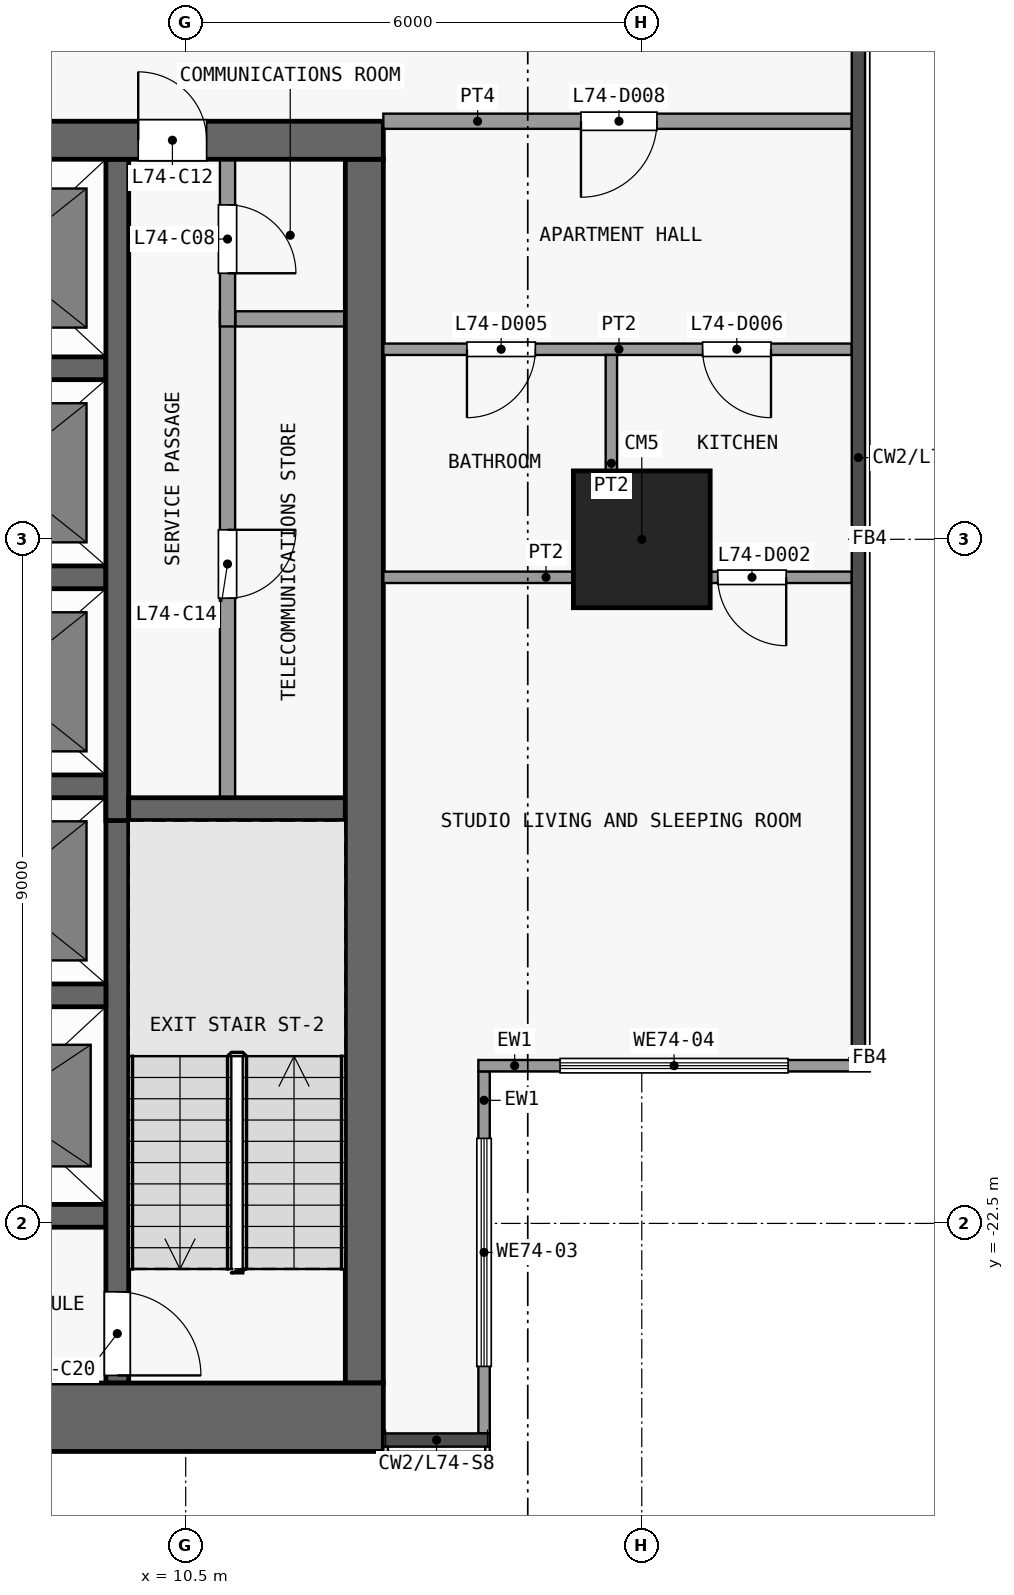
"""IFC4 building model, lengths in metres.
Left out: names, types, materials, properties, quantities, classifications, styles, units other than length and angle.
Written with IfcOpenShell. Run it as: python <this file> out.ifc"""

import sys

from ifc_helpers import new_model, si_unit, direction, frame, frame_2d, origin, origin_2d, place, context, subcontext, project, spatial, rectangle, extrude, element, fill, save


model = new_model("IFC4")
c1 = context("Model", 3, precision=1e-05, world=origin(), true_north=direction((0.0, 1.0)))
c2 = subcontext(c1, "Body", "Model", "MODEL_VIEW")
j1 = project(units=[si_unit("LENGTHUNIT", "METRE"), si_unit("PLANEANGLEUNIT", "RADIAN")], contexts=[c1])
p1 = place(None, origin())
s1 = spatial("IfcSite", under=j1, at=p1, CompositionType="ELEMENT")
p2 = place(p1, origin())
s2 = spatial("IfcBuilding", under=s1, at=p2, CompositionType="ELEMENT")
p3 = place(p2, frame((0.0, 0.0, 291.5)))
s3 = spatial("IfcBuildingStorey", under=s2, at=p3, CompositionType="ELEMENT", Elevation=291.5)
p4 = place(p3, frame((16.5, -13.5, 0.0), z_axis=(0.0, 0.0, 1.0), x_axis=(1.0, 0.0, 0.0)))
e1 = element("IfcColumn", 1, at=p4, inside=s3, PredefinedType="COLUMN", context=c2, shape_type="SweptSolid", body=[
    extrude(rectangle(XDim=1.8, YDim=1.8, at=origin_2d()), origin(), (0.0, 0.0, 1.0), 3.6),
])
p5 = place(p3, frame((-13.1, -25.05, 0.0), z_axis=(0.0, 0.0, 1.0), x_axis=(1.0, 0.0, 0.0)))
e2 = element("IfcWall", 2, at=p5, inside=s3, PredefinedType="SHEAR", context=c2, shape_type="SweptSolid", body=[
    extrude(rectangle(XDim=26.2, YDim=0.9, at=frame_2d((13.1, 0.0))), origin(), (0.0, 0.0, 1.0), 3.3),
])
p6 = place(p3, frame((-13.1, -8.25, 0.0), z_axis=(0.0, 0.0, 1.0), x_axis=(1.0, 0.0, 0.0)))
e3 = element("IfcWall", 3, at=p6, inside=s3, PredefinedType="SHEAR", context=c2, shape_type="SweptSolid", body=[
    extrude(rectangle(XDim=26.2, YDim=0.5, at=frame_2d((13.1, 0.0))), origin(), (0.0, 0.0, 1.0), 3.3),
])
p7 = place(p6, frame((7.4, 0.0, 0.0)))
e4 = element("IfcOpeningElement", 4, at=p7, cuts=e3, PredefinedType="OPENING", context=c2, shape_type="SweptSolid", body=[
    extrude(rectangle(XDim=1.8, YDim=2.1, at=frame_2d((0.9, 1.05))), frame((0.0, 0.26, 0.0), z_axis=(0.0, -1.0, 0.0), x_axis=(1.0, 0.0, 0.0)), (0.0, 0.0, 1.0), 0.52),
])
p8 = place(p6, frame((17.0, 0.0, 0.0)))
e5 = element("IfcOpeningElement", 5, at=p8, cuts=e3, PredefinedType="OPENING", context=c2, shape_type="SweptSolid", body=[
    extrude(rectangle(XDim=1.8, YDim=2.1, at=frame_2d((0.9, 1.05))), frame((0.0, 0.26, 0.0), z_axis=(0.0, -1.0, 0.0), x_axis=(1.0, 0.0, 0.0)), (0.0, 0.0, 1.0), 0.52),
])
p9 = place(p6, frame((2.325, 0.0, 0.0)))
e6 = element("IfcOpeningElement", 6, at=p9, cuts=e3, PredefinedType="OPENING", context=c2, shape_type="SweptSolid", body=[
    extrude(rectangle(XDim=0.9, YDim=2.1, at=frame_2d((0.45, 1.05))), frame((0.0, 0.26, 0.0), z_axis=(0.0, -1.0, 0.0), x_axis=(1.0, 0.0, 0.0)), (0.0, 0.0, 1.0), 0.52),
])
p10 = place(p6, frame((22.975, 0.0, 0.0)))
e7 = element("IfcOpeningElement", 7, at=p10, cuts=e3, PredefinedType="OPENING", context=c2, shape_type="SweptSolid", body=[
    extrude(rectangle(XDim=0.9, YDim=2.1, at=frame_2d((0.45, 1.05))), frame((0.0, 0.26, 0.0), z_axis=(0.0, -1.0, 0.0), x_axis=(1.0, 0.0, 0.0)), (0.0, 0.0, 1.0), 0.52),
])
p11 = place(p3, frame((12.85, -24.6, 0.0), z_axis=(0.0, 0.0, 1.0), x_axis=(0.0, 1.0, 0.0)))
e8 = element("IfcWall", 8, at=p11, inside=s3, PredefinedType="SHEAR", context=c2, shape_type="SweptSolid", body=[
    extrude(rectangle(XDim=16.1, YDim=0.5, at=frame_2d((8.05, 0.0))), origin(), (0.0, 0.0, 1.0), 3.3),
])
for number, where, z_axis, x_axis in (
    (9, (6.65, -22.4, 0.0), (0.0, 0.0, 1.0), (1.0, 0.0, 0.0)),
    (10, (6.65, -19.5, 0.0), (0.0, 0.0, 1.0), (1.0, 0.0, 0.0)),
):
    element("IfcWall", number, at=place(p3, frame(where, z_axis=z_axis, x_axis=x_axis)), inside=s3, PredefinedType="SHEAR", context=c2, shape_type="SweptSolid", body=[
        extrude(rectangle(XDim=2.8, YDim=0.3, at=frame_2d((1.4, 0.0))), origin(), (0.0, 0.0, 1.0), 3.3),
    ])
p12 = place(p3, frame((9.75, -17.05, 0.0), z_axis=(0.0, 0.0, 1.0), x_axis=(1.0, 0.0, 0.0)))
e11 = element("IfcWall", 11, at=p12, inside=s3, PredefinedType="SHEAR", context=c2, shape_type="SweptSolid", body=[
    extrude(rectangle(XDim=2.85, YDim=0.3, at=frame_2d((1.425, 0.0))), origin(), (0.0, 0.0, 1.0), 3.3),
])
for number, where, z_axis, x_axis in (
    (12, (6.65, -16.75, 0.0), (0.0, 0.0, 1.0), (1.0, 0.0, 0.0)),
    (13, (6.65, -14.0, 0.0), (0.0, 0.0, 1.0), (1.0, 0.0, 0.0)),
    (14, (6.65, -11.25, 0.0), (0.0, 0.0, 1.0), (1.0, 0.0, 0.0)),
):
    element("IfcWall", number, at=place(p3, frame(where, z_axis=z_axis, x_axis=x_axis)), inside=s3, PredefinedType="SHEAR", context=c2, shape_type="SweptSolid", body=[
        extrude(rectangle(XDim=2.8, YDim=0.3, at=frame_2d((1.4, 0.0))), origin(), (0.0, 0.0, 1.0), 3.3),
    ])
p13 = place(p3, frame((11.15, -10.6, 0.0), z_axis=(0.0, 0.0, 1.0), x_axis=(1.0, 0.0, 0.0)))
e15 = element("IfcWall", 15, at=p13, inside=s3, PredefinedType="PARTITIONING", context=c2, shape_type="SweptSolid", body=[
    extrude(rectangle(XDim=1.45, YDim=0.2, at=frame_2d((0.725, 0.0))), origin(), (0.0, 0.0, 1.0), 3.3),
])
p14 = place(p3, frame((9.6, -16.9, 0.0), z_axis=(0.0, 0.0, 1.0), x_axis=(0.0, -1.0, 0.0)))
e16 = element("IfcWall", 16, at=p14, inside=s3, PredefinedType="SHEAR", context=c2, shape_type="SweptSolid", body=[
    extrude(rectangle(XDim=7.7, YDim=0.3, at=frame_2d((3.85, 0.0))), origin(), (0.0, 0.0, 1.0), 3.3),
])
p15 = place(p14, frame((6.5, 0.0, 0.0)))
e17 = element("IfcOpeningElement", 17, at=p15, cuts=e16, PredefinedType="OPENING", context=c2, shape_type="SweptSolid", body=[
    extrude(rectangle(XDim=1.1, YDim=2.1, at=frame_2d((0.55, 1.05))), frame((0.0, 0.16, 0.0), z_axis=(0.0, -1.0, 0.0), x_axis=(1.0, 0.0, 0.0)), (0.0, 0.0, 1.0), 0.32),
])
p16 = place(p3, frame((9.6, -17.2, 0.0), z_axis=(0.0, 0.0, 1.0), x_axis=(0.0, 1.0, 0.0)))
e18 = element("IfcWall", 18, at=p16, inside=s3, PredefinedType="SHEAR", context=c2, shape_type="SweptSolid", body=[
    extrude(rectangle(XDim=8.7, YDim=0.3, at=frame_2d((4.35, 0.0))), origin(), (0.0, 0.0, 1.0), 3.3),
])
p17 = place(p3, frame((11.05, -10.5, 0.0), z_axis=(0.0, 0.0, 1.0), x_axis=(0.0, -1.0, 0.0)))
e19 = element("IfcWall", 19, at=p17, inside=s3, PredefinedType="PARTITIONING", context=c2, shape_type="SweptSolid", body=[
    extrude(rectangle(XDim=6.4, YDim=0.2, at=frame_2d((3.2, 0.0))), origin(), (0.0, 0.0, 1.0), 3.3),
])
p18 = place(p17, frame((2.875, 0.0, 0.0)))
e20 = element("IfcOpeningElement", 20, at=p18, cuts=e19, PredefinedType="OPENING", context=c2, shape_type="SweptSolid", body=[
    extrude(rectangle(XDim=0.9, YDim=2.1, at=frame_2d((0.45, 1.05))), frame((0.0, 0.11, 0.0), z_axis=(0.0, -1.0, 0.0), x_axis=(1.0, 0.0, 0.0)), (0.0, 0.0, 1.0), 0.22),
])
p19 = place(p3, frame((11.05, -8.5, 0.0), z_axis=(0.0, 0.0, 1.0), x_axis=(0.0, -1.0, 0.0)))
e21 = element("IfcWall", 21, at=p19, inside=s3, PredefinedType="PARTITIONING", context=c2, shape_type="SweptSolid", body=[
    extrude(rectangle(XDim=2.2, YDim=0.2, at=frame_2d((1.1, 0.0))), origin(), (0.0, 0.0, 1.0), 3.3),
])
p20 = place(p19, frame((0.6, 0.0, 0.0)))
e22 = element("IfcOpeningElement", 22, at=p20, cuts=e21, PredefinedType="OPENING", context=c2, shape_type="SweptSolid", body=[
    extrude(rectangle(XDim=0.9, YDim=2.1, at=frame_2d((0.45, 1.05))), frame((0.0, 0.11, 0.0), z_axis=(0.0, -1.0, 0.0), x_axis=(1.0, 0.0, 0.0)), (0.0, 0.0, 1.0), 0.22),
])
p21 = place(p3, frame((14.425, -20.5, 0.0), z_axis=(0.0, 0.0, 1.0), x_axis=(0.0, -1.0, 0.0)))
e23 = element("IfcWall", 23, at=p21, inside=s3, PredefinedType="SOLIDWALL", context=c2, shape_type="SweptSolid", body=[
    extrude(rectangle(XDim=4.762, YDim=0.15, at=frame_2d((2.381, 0.0))), origin(), (0.0, 0.0, 1.0), 3.3),
])
p22 = place(p21, frame((0.881, 0.0, 0.9)))
e24 = element("IfcOpeningElement", 24, at=p22, cuts=e23, PredefinedType="OPENING", context=c2, shape_type="SweptSolid", body=[
    extrude(rectangle(XDim=3.0, YDim=2.4, at=frame_2d((1.5, 1.2))), frame((0.0, 0.085, 0.0), z_axis=(0.0, -1.0, 0.0), x_axis=(1.0, 0.0, 0.0)), (0.0, 0.0, 1.0), 0.17),
])
p23 = place(p3, frame((19.5, -20.425, 0.0), z_axis=(0.0, 0.0, 1.0), x_axis=(-1.0, 0.0, 0.0)))
e25 = element("IfcWall", 25, at=p23, inside=s3, PredefinedType="SOLIDWALL", context=c2, shape_type="SweptSolid", body=[
    extrude(rectangle(XDim=5.15, YDim=0.15, at=frame_2d((2.575, 0.0))), origin(), (0.0, 0.0, 1.0), 3.3),
])
p24 = place(p23, frame((1.075, 0.0, 0.9)))
e26 = element("IfcOpeningElement", 26, at=p24, cuts=e25, PredefinedType="OPENING", context=c2, shape_type="SweptSolid", body=[
    extrude(rectangle(XDim=3.0, YDim=2.4, at=frame_2d((1.5, 1.2))), frame((0.0, 0.085, 0.0), z_axis=(0.0, -1.0, 0.0), x_axis=(1.0, 0.0, 0.0)), (0.0, 0.0, 1.0), 0.17),
])
p25 = place(p3, frame((13.1, -14.0, 0.0), z_axis=(0.0, 0.0, 1.0), x_axis=(1.0, 0.0, 0.0)))
e27 = element("IfcWall", 27, at=p25, inside=s3, PredefinedType="PARTITIONING", context=c2, shape_type="SweptSolid", body=[
    extrude(rectangle(XDim=6.162, YDim=0.15, at=frame_2d((3.081, 0.0))), origin(), (0.0, 0.0, 1.0), 3.3),
])
p26 = place(p25, frame((4.4, 0.0, 0.0)))
e28 = element("IfcOpeningElement", 28, at=p26, cuts=e27, PredefinedType="OPENING", context=c2, shape_type="SweptSolid", body=[
    extrude(rectangle(XDim=0.9, YDim=2.1, at=frame_2d((0.45, 1.05))), frame((0.0, 0.085, 0.0), z_axis=(0.0, -1.0, 0.0), x_axis=(1.0, 0.0, 0.0)), (0.0, 0.0, 1.0), 0.17),
])
p27 = place(p3, frame((13.1, -11.0, 0.0), z_axis=(0.0, 0.0, 1.0), x_axis=(1.0, 0.0, 0.0)))
e29 = element("IfcWall", 29, at=p27, inside=s3, PredefinedType="PARTITIONING", context=c2, shape_type="SweptSolid", body=[
    extrude(rectangle(XDim=6.162, YDim=0.15, at=frame_2d((3.081, 0.0))), origin(), (0.0, 0.0, 1.0), 3.3),
])
p28 = place(p27, frame((1.1, 0.0, 0.0)))
e30 = element("IfcOpeningElement", 30, at=p28, cuts=e29, PredefinedType="OPENING", context=c2, shape_type="SweptSolid", body=[
    extrude(rectangle(XDim=0.9, YDim=2.1, at=frame_2d((0.45, 1.05))), frame((0.0, 0.085, 0.0), z_axis=(0.0, -1.0, 0.0), x_axis=(1.0, 0.0, 0.0)), (0.0, 0.0, 1.0), 0.17),
])
p29 = place(p27, frame((4.2, 0.0, 0.0)))
e31 = element("IfcOpeningElement", 31, at=p29, cuts=e29, PredefinedType="OPENING", context=c2, shape_type="SweptSolid", body=[
    extrude(rectangle(XDim=0.9, YDim=2.1, at=frame_2d((0.45, 1.05))), frame((0.0, 0.085, 0.0), z_axis=(0.0, -1.0, 0.0), x_axis=(1.0, 0.0, 0.0)), (0.0, 0.0, 1.0), 0.17),
])
p30 = place(p3, frame((13.1, -8.0, 0.0), z_axis=(0.0, 0.0, 1.0), x_axis=(1.0, 0.0, 0.0)))
e32 = element("IfcWall", 32, at=p30, inside=s3, PredefinedType="PARTITIONING", context=c2, shape_type="SweptSolid", body=[
    extrude(rectangle(XDim=6.162, YDim=0.2, at=frame_2d((3.081, 0.0))), origin(), (0.0, 0.0, 1.0), 3.3),
])
p31 = place(p30, frame((2.6, 0.0, 0.0)))
e33 = element("IfcOpeningElement", 33, at=p31, cuts=e32, PredefinedType="OPENING", context=c2, shape_type="SweptSolid", body=[
    extrude(rectangle(XDim=1.0, YDim=2.1, at=frame_2d((0.5, 1.05))), frame((0.0, 0.11, 0.0), z_axis=(0.0, -1.0, 0.0), x_axis=(1.0, 0.0, 0.0)), (0.0, 0.0, 1.0), 0.22),
])
p32 = place(p3, frame((16.1, -13.925, 0.0), z_axis=(0.0, 0.0, 1.0), x_axis=(0.0, 1.0, 0.0)))
e34 = element("IfcWall", 34, at=p32, inside=s3, PredefinedType="PARTITIONING", context=c2, shape_type="SweptSolid", body=[
    extrude(rectangle(XDim=2.85, YDim=0.15, at=frame_2d((1.425, 0.0))), origin(), (0.0, 0.0, 1.0), 3.3),
])
p33 = place(p20, origin())
e35 = element("IfcDoor", 35, at=p33, inside=s3, OperationType="SINGLE_SWING_RIGHT", PredefinedType="DOOR", context=c2, shape_type="SweptSolid", body=[
    extrude(rectangle(XDim=0.9, YDim=2.1, at=frame_2d((0.45, 1.05))), frame((0.0, 0.025, 0.0), z_axis=(0.0, -1.0, 0.0), x_axis=(1.0, 0.0, 0.0)), (0.0, 0.0, 1.0), 0.05),
])
fill(e22, e35)
p34 = place(p10, origin())
e36 = element("IfcDoor", 36, at=p34, inside=s3, OperationType="SINGLE_SWING_LEFT", PredefinedType="DOOR", context=c2, shape_type="SweptSolid", body=[
    extrude(rectangle(XDim=0.9, YDim=2.1, at=frame_2d((0.45, 1.05))), frame((0.0, 0.025, 0.0), z_axis=(0.0, -1.0, 0.0), x_axis=(1.0, 0.0, 0.0)), (0.0, 0.0, 1.0), 0.05),
])
fill(e7, e36)
p35 = place(p18, origin())
e37 = element("IfcDoor", 37, at=p35, inside=s3, OperationType="SINGLE_SWING_LEFT", PredefinedType="DOOR", context=c2, shape_type="SweptSolid", body=[
    extrude(rectangle(XDim=0.9, YDim=2.1, at=frame_2d((0.45, 1.05))), frame((0.0, 0.025, 0.0), z_axis=(0.0, -1.0, 0.0), x_axis=(1.0, 0.0, 0.0)), (0.0, 0.0, 1.0), 0.05),
])
fill(e20, e37)
p36 = place(p15, origin())
e38 = element("IfcDoor", 38, at=p36, inside=s3, OperationType="SINGLE_SWING_RIGHT", PredefinedType="DOOR", context=c2, shape_type="SweptSolid", body=[
    extrude(rectangle(XDim=1.1, YDim=2.1, at=frame_2d((0.55, 1.05))), frame((0.0, 0.025, 0.0), z_axis=(0.0, -1.0, 0.0), x_axis=(1.0, 0.0, 0.0)), (0.0, 0.0, 1.0), 0.05),
])
fill(e17, e38)
p37 = place(p22, origin())
e39 = element("IfcWindow", 39, at=p37, inside=s3, PartitioningType="SINGLE_PANEL", PredefinedType="WINDOW", context=c2, shape_type="SweptSolid", body=[
    extrude(rectangle(XDim=3.0, YDim=2.4, at=frame_2d((1.5, 1.2))), frame((0.0, 0.03, 0.0), z_axis=(0.0, -1.0, 0.0), x_axis=(1.0, 0.0, 0.0)), (0.0, 0.0, 1.0), 0.06),
])
fill(e24, e39)
p38 = place(p24, origin())
e40 = element("IfcWindow", 40, at=p38, inside=s3, PartitioningType="SINGLE_PANEL", PredefinedType="WINDOW", context=c2, shape_type="SweptSolid", body=[
    extrude(rectangle(XDim=3.0, YDim=2.4, at=frame_2d((1.5, 1.2))), frame((0.0, 0.03, 0.0), z_axis=(0.0, -1.0, 0.0), x_axis=(1.0, 0.0, 0.0)), (0.0, 0.0, 1.0), 0.06),
])
fill(e26, e40)
p39 = place(p26, origin())
e41 = element("IfcDoor", 41, at=p39, inside=s3, OperationType="SINGLE_SWING_RIGHT", PredefinedType="DOOR", context=c2, shape_type="SweptSolid", body=[
    extrude(rectangle(XDim=0.9, YDim=2.1, at=frame_2d((0.45, 1.05))), frame((0.0, 0.025, 0.0), z_axis=(0.0, -1.0, 0.0), x_axis=(1.0, 0.0, 0.0)), (0.0, 0.0, 1.0), 0.05),
])
fill(e28, e41)
p40 = place(p28, origin())
e42 = element("IfcDoor", 42, at=p40, inside=s3, OperationType="SINGLE_SWING_LEFT", PredefinedType="DOOR", context=c2, shape_type="SweptSolid", body=[
    extrude(rectangle(XDim=0.9, YDim=2.1, at=frame_2d((0.45, 1.05))), frame((0.0, 0.025, 0.0), z_axis=(0.0, -1.0, 0.0), x_axis=(1.0, 0.0, 0.0)), (0.0, 0.0, 1.0), 0.05),
])
fill(e30, e42)
p41 = place(p29, origin())
e43 = element("IfcDoor", 43, at=p41, inside=s3, OperationType="SINGLE_SWING_RIGHT", PredefinedType="DOOR", context=c2, shape_type="SweptSolid", body=[
    extrude(rectangle(XDim=0.9, YDim=2.1, at=frame_2d((0.45, 1.05))), frame((0.0, 0.025, 0.0), z_axis=(0.0, -1.0, 0.0), x_axis=(1.0, 0.0, 0.0)), (0.0, 0.0, 1.0), 0.05),
])
fill(e31, e43)
p42 = place(p31, origin())
e44 = element("IfcDoor", 44, at=p42, inside=s3, OperationType="SINGLE_SWING_LEFT", PredefinedType="DOOR", context=c2, shape_type="SweptSolid", body=[
    extrude(rectangle(XDim=1.0, YDim=2.1, at=frame_2d((0.5, 1.05))), frame((0.0, 0.025, 0.0), z_axis=(0.0, -1.0, 0.0), x_axis=(1.0, 0.0, 0.0)), (0.0, 0.0, 1.0), 0.05),
])
fill(e33, e44)
save(model, sys.argv[1])
